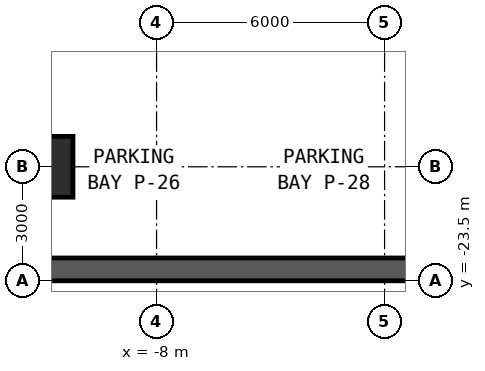
"""IFC4 building model, lengths in metres.
Left out: names, types, materials, properties, quantities, classifications, styles, units other than length and angle.
Written with IfcOpenShell. Run it as: python <this file> out.ifc"""

import sys

from ifc_helpers import new_model, si_unit, direction, frame, frame_2d, origin, origin_2d, place, context, subcontext, project, spatial, rectangle, extrude, element, save


model = new_model("IFC4")
c1 = context("Model", 3, precision=1e-05, world=origin(), true_north=direction((0.0, 1.0)))
c2 = subcontext(c1, "Body", "Model", "MODEL_VIEW")
j1 = project(units=[si_unit("LENGTHUNIT", "METRE"), si_unit("PLANEANGLEUNIT", "RADIAN")], contexts=[c1])
p1 = place(None, origin())
s1 = spatial("IfcSite", under=j1, at=p1, CompositionType="ELEMENT")
p2 = place(p1, origin())
s2 = spatial("IfcBuilding", under=s1, at=p2, CompositionType="ELEMENT")
p3 = place(p2, frame((0.0, 0.0, -10.0)))
s3 = spatial("IfcBuildingStorey", under=s2, at=p3, CompositionType="ELEMENT", Elevation=-10.0)
p4 = place(p3, frame((-34.0, -23.2, 0.0), z_axis=(0.0, 0.0, 1.0), x_axis=(1.0, 0.0, 0.0)))
e1 = element("IfcWall", 1, at=p4, inside=s3, PredefinedType="SOLIDWALL", context=c2, shape_type="SweptSolid", body=[
    extrude(rectangle(XDim=68.0, YDim=0.6, at=frame_2d((34.0, 0.0))), origin(), (0.0, 0.0, 1.0), 4.48),
])
p5 = place(p3, frame((-11.0, -20.5, 0.0), z_axis=(0.0, 0.0, 1.0), x_axis=(1.0, 0.0, 0.0)))
e2 = element("IfcColumn", 2, at=p5, inside=s3, PredefinedType="COLUMN", context=c2, shape_type="SweptSolid", body=[
    extrude(rectangle(XDim=1.6, YDim=1.6, at=origin_2d()), origin(), (0.0, 0.0, 1.0), 4.8),
])
save(model, sys.argv[1])
